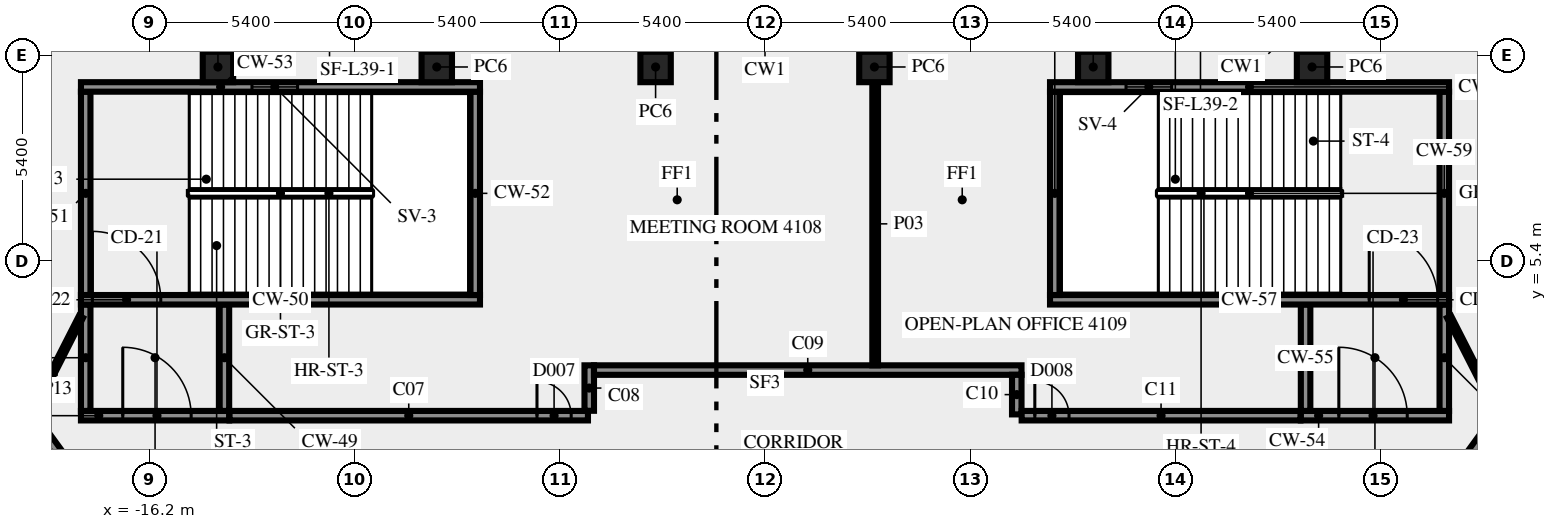
"""IFC4 building model, lengths in metres.
Left out: names, types, materials, properties, quantities, classifications, styles, units other than length and angle.
Written with IfcOpenShell. Run it as: python <this file> out.ifc"""

import sys

from ifc_helpers import new_model, si_unit, direction, frame, frame_2d, origin, origin_2d, place, context, subcontext, project, spatial, rectangle, extrude, element, fill, save


model = new_model("IFC4")
c1 = context("Model", 3, precision=1e-05, world=origin(), true_north=direction((0.0, 1.0)))
c2 = subcontext(c1, "Body", "Model", "MODEL_VIEW")
j1 = project(units=[si_unit("LENGTHUNIT", "METRE"), si_unit("PLANEANGLEUNIT", "RADIAN")], contexts=[c1])
p1 = place(None, origin())
s1 = spatial("IfcSite", under=j1, at=p1, CompositionType="ELEMENT")
p2 = place(p1, origin())
s2 = spatial("IfcBuilding", under=s1, at=p2, CompositionType="ELEMENT")
p3 = place(p2, frame((0.0, 0.0, 176.0)))
s3 = spatial("IfcBuildingStorey", under=s2, at=p3, CompositionType="ELEMENT", Elevation=176.0)
for number, where, z_axis, x_axis in (
    (1, (14.395, 10.5, 0.0), (0.0, 0.0, 1.0), (-1.0, 0.0, 0.0)),
    (2, (8.637, 10.5, 0.0), (0.0, 0.0, 1.0), (-1.0, 0.0, 0.0)),
    (3, (2.879, 10.5, 0.0), (0.0, 0.0, 1.0), (-1.0, 0.0, 0.0)),
    (4, (-2.879, 10.5, 0.0), (0.0, 0.0, 1.0), (-1.0, 0.0, 0.0)),
    (5, (-8.637, 10.5, 0.0), (0.0, 0.0, 1.0), (-1.0, 0.0, 0.0)),
    (6, (-14.395, 10.5, 0.0), (0.0, 0.0, 1.0), (-1.0, 0.0, 0.0)),
):
    element("IfcColumn", number, at=place(p3, frame(where, z_axis=z_axis, x_axis=x_axis)), inside=s3, PredefinedType="COLUMN", context=c2, shape_type="SweptSolid", body=[
        extrude(rectangle(XDim=0.8, YDim=0.8, at=origin_2d()), origin(), (0.0, 0.0, 1.0), 3.65),
    ])
p4 = place(p3, frame((-18.0, 1.325, 0.0), z_axis=(0.0, 0.0, 1.0), x_axis=(1.0, 0.0, 0.0)))
e7 = element("IfcWall", 7, at=p4, inside=s3, PredefinedType="SHEAR", context=c2, shape_type="SweptSolid", body=[
    extrude(rectangle(XDim=3.9, YDim=0.25, at=frame_2d((1.95, 0.0))), origin(), (0.0, 0.0, 1.0), 3.65),
])
p5 = place(p4, frame((1.1, 0.0, 0.0)))
e8 = element("IfcOpeningElement", 8, at=p5, cuts=e7, PredefinedType="OPENING", context=c2, shape_type="SweptSolid", body=[
    extrude(rectangle(XDim=1.8, YDim=2.1, at=frame_2d((0.9, 1.05))), frame((0.0, 0.135, 0.0), z_axis=(0.0, -1.0, 0.0), x_axis=(1.0, 0.0, 0.0)), (0.0, 0.0, 1.0), 0.27),
])
for number, where, z_axis, x_axis in (
    (9, (-17.875, 1.45, 0.0), (0.0, 0.0, 1.0), (0.0, 1.0, 0.0)),
    (10, (-14.225, 1.45, 0.0), (0.0, 0.0, 1.0), (0.0, 1.0, 0.0)),
):
    element("IfcWall", number, at=place(p3, frame(where, z_axis=z_axis, x_axis=x_axis)), inside=s3, PredefinedType="SHEAR", context=c2, shape_type="SweptSolid", body=[
        extrude(rectangle(XDim=2.8, YDim=0.25, at=frame_2d((1.4, 0.0))), origin(), (0.0, 0.0, 1.0), 3.65),
    ])
p6 = place(p3, frame((-18.0, 4.375, 0.0), z_axis=(0.0, 0.0, 1.0), x_axis=(1.0, 0.0, 0.0)))
e11 = element("IfcWall", 11, at=p6, inside=s3, PredefinedType="SHEAR", context=c2, shape_type="SweptSolid", body=[
    extrude(rectangle(XDim=10.5, YDim=0.25, at=frame_2d((5.25, 0.0))), origin(), (0.0, 0.0, 1.0), 3.65),
])
p7 = place(p6, frame((0.3, 0.0, 0.0)))
e12 = element("IfcOpeningElement", 12, at=p7, cuts=e11, PredefinedType="OPENING", context=c2, shape_type="SweptSolid", body=[
    extrude(rectangle(XDim=1.8, YDim=2.1, at=frame_2d((0.9, 1.05))), frame((0.0, 0.135, 0.0), z_axis=(0.0, -1.0, 0.0), x_axis=(1.0, 0.0, 0.0)), (0.0, 0.0, 1.0), 0.27),
])
for number, where, z_axis, x_axis in (
    (13, (-17.875, 4.5, 0.0), (0.0, 0.0, 1.0), (0.0, 1.0, 0.0)),
    (14, (-7.625, 4.5, 0.0), (0.0, 0.0, 1.0), (0.0, 1.0, 0.0)),
):
    element("IfcWall", number, at=place(p3, frame(where, z_axis=z_axis, x_axis=x_axis)), inside=s3, PredefinedType="SHEAR", context=c2, shape_type="SweptSolid", body=[
        extrude(rectangle(XDim=5.35, YDim=0.25, at=frame_2d((2.675, 0.0))), origin(), (0.0, 0.0, 1.0), 3.65),
    ])
p8 = place(p3, frame((-18.0, 9.975, 0.0), z_axis=(0.0, 0.0, 1.0), x_axis=(1.0, 0.0, 0.0)))
e15 = element("IfcWall", 15, at=p8, inside=s3, PredefinedType="SHEAR", context=c2, shape_type="SweptSolid", body=[
    extrude(rectangle(XDim=10.5, YDim=0.25, at=frame_2d((5.25, 0.0))), origin(), (0.0, 0.0, 1.0), 3.65),
])
p9 = place(p8, frame((4.5, 0.0, 1.0)))
e16 = element("IfcOpeningElement", 16, at=p9, cuts=e15, PredefinedType="OPENING", context=c2, shape_type="SweptSolid", body=[
    extrude(rectangle(XDim=1.2, YDim=1.2, at=frame_2d((0.6, 0.6))), frame((0.0, 0.135, 0.0), z_axis=(0.0, -1.0, 0.0), x_axis=(1.0, 0.0, 0.0)), (0.0, 0.0, 1.0), 0.27),
])
p10 = place(p3, frame((14.1, 1.325, 0.0), z_axis=(0.0, 0.0, 1.0), x_axis=(1.0, 0.0, 0.0)))
e17 = element("IfcWall", 17, at=p10, inside=s3, PredefinedType="SHEAR", context=c2, shape_type="SweptSolid", body=[
    extrude(rectangle(XDim=3.9, YDim=0.25, at=frame_2d((1.95, 0.0))), origin(), (0.0, 0.0, 1.0), 3.65),
])
p11 = place(p10, frame((1.0, 0.0, 0.0)))
e18 = element("IfcOpeningElement", 18, at=p11, cuts=e17, PredefinedType="OPENING", context=c2, shape_type="SweptSolid", body=[
    extrude(rectangle(XDim=1.8, YDim=2.1, at=frame_2d((0.9, 1.05))), frame((0.0, 0.135, 0.0), z_axis=(0.0, -1.0, 0.0), x_axis=(1.0, 0.0, 0.0)), (0.0, 0.0, 1.0), 0.27),
])
for number, where, z_axis, x_axis in (
    (19, (14.225, 1.45, 0.0), (0.0, 0.0, 1.0), (0.0, 1.0, 0.0)),
    (20, (17.875, 1.45, 0.0), (0.0, 0.0, 1.0), (0.0, 1.0, 0.0)),
):
    element("IfcWall", number, at=place(p3, frame(where, z_axis=z_axis, x_axis=x_axis)), inside=s3, PredefinedType="SHEAR", context=c2, shape_type="SweptSolid", body=[
        extrude(rectangle(XDim=2.8, YDim=0.25, at=frame_2d((1.4, 0.0))), origin(), (0.0, 0.0, 1.0), 3.65),
    ])
p12 = place(p3, frame((7.5, 4.375, 0.0), z_axis=(0.0, 0.0, 1.0), x_axis=(1.0, 0.0, 0.0)))
e21 = element("IfcWall", 21, at=p12, inside=s3, PredefinedType="SHEAR", context=c2, shape_type="SweptSolid", body=[
    extrude(rectangle(XDim=10.5, YDim=0.25, at=frame_2d((5.25, 0.0))), origin(), (0.0, 0.0, 1.0), 3.65),
])
p13 = place(p12, frame((8.4, 0.0, 0.0)))
e22 = element("IfcOpeningElement", 22, at=p13, cuts=e21, PredefinedType="OPENING", context=c2, shape_type="SweptSolid", body=[
    extrude(rectangle(XDim=1.8, YDim=2.1, at=frame_2d((0.9, 1.05))), frame((0.0, 0.135, 0.0), z_axis=(0.0, -1.0, 0.0), x_axis=(1.0, 0.0, 0.0)), (0.0, 0.0, 1.0), 0.27),
])
for number, where, z_axis, x_axis in (
    (23, (7.625, 4.5, 0.0), (0.0, 0.0, 1.0), (0.0, 1.0, 0.0)),
    (24, (17.875, 4.5, 0.0), (0.0, 0.0, 1.0), (0.0, 1.0, 0.0)),
):
    element("IfcWall", number, at=place(p3, frame(where, z_axis=z_axis, x_axis=x_axis)), inside=s3, PredefinedType="SHEAR", context=c2, shape_type="SweptSolid", body=[
        extrude(rectangle(XDim=5.35, YDim=0.25, at=frame_2d((2.675, 0.0))), origin(), (0.0, 0.0, 1.0), 3.65),
    ])
p14 = place(p3, frame((7.5, 9.975, 0.0), z_axis=(0.0, 0.0, 1.0), x_axis=(1.0, 0.0, 0.0)))
e25 = element("IfcWall", 25, at=p14, inside=s3, PredefinedType="SHEAR", context=c2, shape_type="SweptSolid", body=[
    extrude(rectangle(XDim=10.5, YDim=0.25, at=frame_2d((5.25, 0.0))), origin(), (0.0, 0.0, 1.0), 3.65),
])
p15 = place(p14, frame((2.0, 0.0, 1.0)))
e26 = element("IfcOpeningElement", 26, at=p15, cuts=e25, PredefinedType="OPENING", context=c2, shape_type="SweptSolid", body=[
    extrude(rectangle(XDim=1.2, YDim=1.2, at=frame_2d((0.6, 0.6))), frame((0.0, 0.135, 0.0), z_axis=(0.0, -1.0, 0.0), x_axis=(1.0, 0.0, 0.0)), (0.0, 0.0, 1.0), 0.27),
])
p16 = place(p3, frame((17.545, -1.125, 0.0), z_axis=(0.0, 0.0, 1.0), x_axis=(0.587786330937, 0.809016210693, 0.0)))
e27 = element("IfcWall", 27, at=p16, inside=s3, PredefinedType="SOLIDWALL", context=c2, shape_type="SweptSolid", body=[
    extrude(rectangle(XDim=30.103, YDim=0.25, at=frame_2d((15.052, 0.0))), origin(), (0.0, 0.0, 1.0), 3.65),
])
p17 = place(p16, frame((3.441, 0.0, 0.0)))
e28 = element("IfcOpeningElement", 28, at=p17, cuts=e27, PredefinedType="OPENING", context=c2, shape_type="SweptSolid", body=[
    extrude(rectangle(XDim=0.9, YDim=2.1, at=frame_2d((0.45, 1.05))), frame((0.0, 0.135, 0.0), z_axis=(0.0, -1.0, 0.0), x_axis=(1.0, 0.0, 0.0)), (0.0, 0.0, 1.0), 0.27),
])
p18 = place(p16, frame((23.158, 0.0, 0.0)))
e29 = element("IfcOpeningElement", 29, at=p18, cuts=e27, PredefinedType="OPENING", context=c2, shape_type="SweptSolid", body=[
    extrude(rectangle(XDim=0.9, YDim=2.1, at=frame_2d((0.45, 1.05))), frame((0.0, 0.135, 0.0), z_axis=(0.0, -1.0, 0.0), x_axis=(1.0, 0.0, 0.0)), (0.0, 0.0, 1.0), 0.27),
])
p19 = place(p16, frame((21.558, 0.0, 0.0)))
e30 = element("IfcOpeningElement", 30, at=p19, cuts=e27, PredefinedType="OPENING", context=c2, shape_type="SweptSolid", body=[
    extrude(rectangle(XDim=0.9, YDim=2.1, at=frame_2d((0.45, 1.05))), frame((0.0, 0.135, 0.0), z_axis=(0.0, -1.0, 0.0), x_axis=(1.0, 0.0, 0.0)), (0.0, 0.0, 1.0), 0.27),
])
p20 = place(p3, frame((-31.918, 18.658, 0.0), z_axis=(0.0, 0.0, 1.0), x_axis=(0.587788731405, -0.80901446664, 0.0)))
e31 = element("IfcWall", 31, at=p20, inside=s3, PredefinedType="SOLIDWALL", context=c2, shape_type="SweptSolid", body=[
    extrude(rectangle(XDim=24.453, YDim=0.25, at=frame_2d((12.227, 0.0))), origin(), (0.0, 0.0, 1.0), 3.65),
])
p21 = place(p20, frame((0.224, 0.0, 0.0)))
e32 = element("IfcOpeningElement", 32, at=p21, cuts=e31, PredefinedType="OPENING", context=c2, shape_type="SweptSolid", body=[
    extrude(rectangle(XDim=0.9, YDim=2.1, at=frame_2d((0.45, 1.05))), frame((0.0, 0.135, 0.0), z_axis=(0.0, -1.0, 0.0), x_axis=(1.0, 0.0, 0.0)), (0.0, 0.0, 1.0), 0.27),
])
p22 = place(p3, frame((-14.09, 1.325, 0.0), z_axis=(0.0, 0.0, 1.0), x_axis=(1.0, 0.0, 0.0)))
e33 = element("IfcWall", 33, at=p22, inside=s3, PredefinedType="SOLIDWALL", context=c2, shape_type="SweptSolid", body=[
    extrude(rectangle(XDim=9.431, YDim=0.25, at=frame_2d((4.716, 0.0))), origin(), (0.0, 0.0, 1.0), 3.65),
])
p23 = place(p22, frame((8.09, 0.0, 0.0)))
e34 = element("IfcOpeningElement", 34, at=p23, cuts=e33, PredefinedType="OPENING", context=c2, shape_type="SweptSolid", body=[
    extrude(rectangle(XDim=0.9, YDim=2.1, at=frame_2d((0.45, 1.05))), frame((0.0, 0.135, 0.0), z_axis=(0.0, -1.0, 0.0), x_axis=(1.0, 0.0, 0.0)), (0.0, 0.0, 1.0), 0.27),
])
p24 = place(p3, frame((-4.625, 1.454, 0.0), z_axis=(0.0, 0.0, 1.0), x_axis=(0.0, 1.0, 0.0)))
e35 = element("IfcWall", 35, at=p24, inside=s3, PredefinedType="SOLIDWALL", context=c2, shape_type="SweptSolid", body=[
    extrude(rectangle(XDim=1.196, YDim=0.25, at=frame_2d((0.598, 0.0))), origin(), (0.0, 0.0, 1.0), 3.65),
])
p25 = place(p3, frame((-4.5, 2.525, 0.0), z_axis=(0.0, 0.0, 1.0), x_axis=(1.0, 0.0, 0.0)))
e36 = element("IfcWall", 36, at=p25, inside=s3, PredefinedType="SOLIDWALL", context=c2, shape_type="SweptSolid", body=[
    extrude(rectangle(XDim=11.25, YDim=0.25, at=frame_2d((5.625, 0.0))), origin(), (0.0, 0.0, 1.0), 3.65),
])
p26 = place(p3, frame((6.625, 2.4, 0.0), z_axis=(0.0, 0.0, 1.0), x_axis=(0.0, -1.0, 0.0)))
e37 = element("IfcWall", 37, at=p26, inside=s3, PredefinedType="SOLIDWALL", context=c2, shape_type="SweptSolid", body=[
    extrude(rectangle(XDim=1.041, YDim=0.25, at=frame_2d((0.521, 0.0))), origin(), (0.0, 0.0, 1.0), 3.65),
])
p27 = place(p3, frame((6.754, 1.325, 0.0), z_axis=(0.0, 0.0, 1.0), x_axis=(1.0, 0.0, 0.0)))
e38 = element("IfcWall", 38, at=p27, inside=s3, PredefinedType="SOLIDWALL", context=c2, shape_type="SweptSolid", body=[
    extrude(rectangle(XDim=7.336, YDim=0.25, at=frame_2d((3.668, 0.0))), origin(), (0.0, 0.0, 1.0), 3.65),
])
p28 = place(p27, frame((0.346, 0.0, 0.0)))
e39 = element("IfcOpeningElement", 39, at=p28, cuts=e38, PredefinedType="OPENING", context=c2, shape_type="SweptSolid", body=[
    extrude(rectangle(XDim=0.9, YDim=2.1, at=frame_2d((0.45, 1.05))), frame((0.0, 0.135, 0.0), z_axis=(0.0, -1.0, 0.0), x_axis=(1.0, 0.0, 0.0)), (0.0, 0.0, 1.0), 0.27),
])
p29 = place(p3, frame((2.899, 10.095, 0.0), z_axis=(0.0, 0.0, 1.0), x_axis=(0.0, -1.0, 0.0)))
e40 = element("IfcWall", 40, at=p29, inside=s3, PredefinedType="PARTITIONING", context=c2, shape_type="SweptSolid", body=[
    extrude(rectangle(XDim=7.445, YDim=0.15, at=frame_2d((3.723, 0.0))), origin(), (0.0, 0.0, 1.0), 3.65),
])
for number, where, z_axis, x_axis in (
    (41, (18.0, 3.925, 0.0), (0.0, 0.0, 1.0), (0.454, -0.891, 0.0)),
    (42, (-19.261, 1.45, 0.0), (0.0, 0.0, 1.0), (0.454, 0.891, 0.0)),
):
    element("IfcWall", number, at=place(p3, frame(where, z_axis=z_axis, x_axis=x_axis)), inside=s3, PredefinedType="PARTITIONING", context=c2, shape_type="SweptSolid", body=[
        extrude(rectangle(XDim=2.778, YDim=0.12, at=frame_2d((1.389, 0.0))), origin(), (0.0, 0.0, 1.0), 3.65),
    ])
p30 = place(p5, origin())
e43 = element("IfcDoor", 43, at=p30, inside=s3, OperationType="DOUBLE_DOOR_SINGLE_SWING", PredefinedType="DOOR", context=c2, shape_type="SweptSolid", body=[
    extrude(rectangle(XDim=1.8, YDim=2.1, at=frame_2d((0.9, 1.05))), frame((0.0, 0.025, 0.0), z_axis=(0.0, -1.0, 0.0), x_axis=(1.0, 0.0, 0.0)), (0.0, 0.0, 1.0), 0.05),
])
fill(e8, e43)
p31 = place(p7, origin())
e44 = element("IfcDoor", 44, at=p31, inside=s3, OperationType="DOUBLE_DOOR_SINGLE_SWING", PredefinedType="DOOR", context=c2, shape_type="SweptSolid", body=[
    extrude(rectangle(XDim=1.8, YDim=2.1, at=frame_2d((0.9, 1.05))), frame((0.0, 0.025, 0.0), z_axis=(0.0, -1.0, 0.0), x_axis=(1.0, 0.0, 0.0)), (0.0, 0.0, 1.0), 0.05),
])
fill(e12, e44)
p32 = place(p9, origin())
e45 = element("IfcWindow", 45, at=p32, inside=s3, PartitioningType="SINGLE_PANEL", PredefinedType="WINDOW", context=c2, shape_type="SweptSolid", body=[
    extrude(rectangle(XDim=1.2, YDim=1.2, at=frame_2d((0.6, 0.6))), frame((0.0, 0.03, 0.0), z_axis=(0.0, -1.0, 0.0), x_axis=(1.0, 0.0, 0.0)), (0.0, 0.0, 1.0), 0.06),
])
fill(e16, e45)
p33 = place(p11, origin())
e46 = element("IfcDoor", 46, at=p33, inside=s3, OperationType="DOUBLE_DOOR_SINGLE_SWING", PredefinedType="DOOR", context=c2, shape_type="SweptSolid", body=[
    extrude(rectangle(XDim=1.8, YDim=2.1, at=frame_2d((0.9, 1.05))), frame((0.0, 0.025, 0.0), z_axis=(0.0, -1.0, 0.0), x_axis=(1.0, 0.0, 0.0)), (0.0, 0.0, 1.0), 0.05),
])
fill(e18, e46)
p34 = place(p13, origin())
e47 = element("IfcDoor", 47, at=p34, inside=s3, OperationType="DOUBLE_DOOR_SINGLE_SWING", PredefinedType="DOOR", context=c2, shape_type="SweptSolid", body=[
    extrude(rectangle(XDim=1.8, YDim=2.1, at=frame_2d((0.9, 1.05))), frame((0.0, 0.025, 0.0), z_axis=(0.0, -1.0, 0.0), x_axis=(1.0, 0.0, 0.0)), (0.0, 0.0, 1.0), 0.05),
])
fill(e22, e47)
p35 = place(p15, origin())
e48 = element("IfcWindow", 48, at=p35, inside=s3, PartitioningType="SINGLE_PANEL", PredefinedType="WINDOW", context=c2, shape_type="SweptSolid", body=[
    extrude(rectangle(XDim=1.2, YDim=1.2, at=frame_2d((0.6, 0.6))), frame((0.0, 0.03, 0.0), z_axis=(0.0, -1.0, 0.0), x_axis=(1.0, 0.0, 0.0)), (0.0, 0.0, 1.0), 0.06),
])
fill(e26, e48)
p36 = place(p28, origin())
e49 = element("IfcDoor", 49, at=p36, inside=s3, OperationType="SINGLE_SWING_LEFT", PredefinedType="DOOR", context=c2, shape_type="SweptSolid", body=[
    extrude(rectangle(XDim=0.9, YDim=2.1, at=frame_2d((0.45, 1.05))), frame((0.0, 0.025, 0.0), z_axis=(0.0, -1.0, 0.0), x_axis=(1.0, 0.0, 0.0)), (0.0, 0.0, 1.0), 0.05),
])
fill(e39, e49)
p37 = place(p23, origin())
e50 = element("IfcDoor", 50, at=p37, inside=s3, OperationType="SINGLE_SWING_RIGHT", PredefinedType="DOOR", context=c2, shape_type="SweptSolid", body=[
    extrude(rectangle(XDim=0.9, YDim=2.1, at=frame_2d((0.45, 1.05))), frame((0.0, 0.025, 0.0), z_axis=(0.0, -1.0, 0.0), x_axis=(1.0, 0.0, 0.0)), (0.0, 0.0, 1.0), 0.05),
])
fill(e34, e50)
save(model, sys.argv[1])
